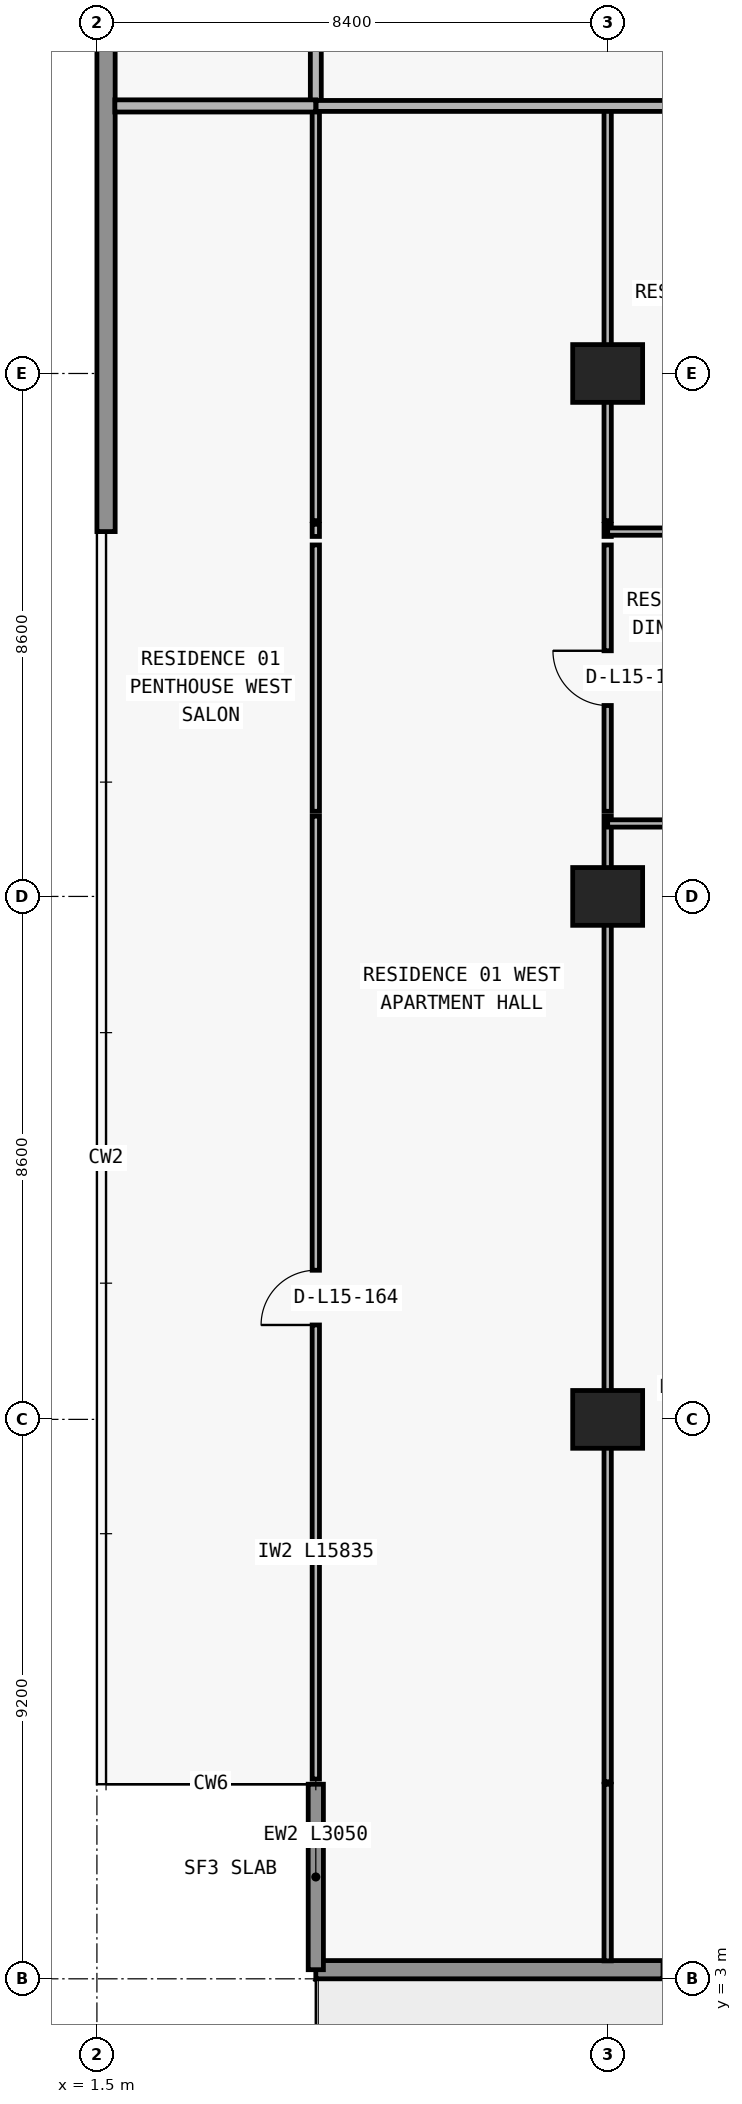
"""IFC4 building model, lengths in metres.
Left out: names, types, materials, properties, quantities, classifications, styles, units other than length and angle.
Written with IfcOpenShell. Run it as: python <this file> out.ifc"""

import sys

from ifc_helpers import new_model, si_unit, direction, frame, frame_2d, origin, origin_2d, place, context, subcontext, project, spatial, rectangle, extrude, element, fill, save


model = new_model("IFC4")
c1 = context("Model", 3, precision=1e-05, world=origin(), true_north=direction((0.0, 1.0)))
c2 = subcontext(c1, "Body", "Model", "MODEL_VIEW")
j1 = project(units=[si_unit("LENGTHUNIT", "METRE"), si_unit("PLANEANGLEUNIT", "RADIAN")], contexts=[c1])
p1 = place(None, origin())
s1 = spatial("IfcSite", under=j1, at=p1, CompositionType="ELEMENT")
p2 = place(p1, origin())
s2 = spatial("IfcBuilding", under=s1, at=p2, CompositionType="ELEMENT")
p3 = place(p2, frame((0.0, 0.0, 59.7)))
s3 = spatial("IfcBuildingStorey", under=s2, at=p3, CompositionType="ELEMENT", Elevation=59.7)
for number, where, z_axis, x_axis in (
    (1, (9.9, 12.2, 0.0), (0.0, 0.0, 1.0), (1.0, 0.0, 0.0)),
    (2, (9.9, 20.8, 0.0), (0.0, 0.0, 1.0), (1.0, 0.0, 0.0)),
    (3, (9.9, 29.4, 0.0), (0.0, 0.0, 1.0), (1.0, 0.0, 0.0)),
):
    element("IfcColumn", number, at=place(p3, frame(where, z_axis=z_axis, x_axis=x_axis)), inside=s3, PredefinedType="COLUMN", context=c2, shape_type="SweptSolid", body=[
        extrude(rectangle(XDim=1.15, YDim=0.95, at=origin_2d()), origin(), (0.0, 0.0, 1.0), 3.05),
    ])
p4 = place(p3, frame((72.7, 3.15, 0.0), z_axis=(0.0, 0.0, 1.0), x_axis=(-1.0, 0.0, 0.0)))
e4 = element("IfcWall", 4, at=p4, inside=s3, PredefinedType="STANDARD", context=c2, shape_type="SweptSolid", body=[
    extrude(rectangle(XDim=67.6, YDim=0.3, at=frame_2d((33.8, 0.0))), origin(), (0.0, 0.0, 1.0), 3.05),
])
p5 = place(p4, frame((59.89, 0.0, 0.0)))
e5 = element("IfcOpeningElement", 5, at=p5, cuts=e4, PredefinedType="OPENING", context=c2, shape_type="SweptSolid", body=[
    extrude(rectangle(XDim=2.0, YDim=2.3, at=frame_2d((1.0, 1.15))), frame((0.0, 0.16, 0.0), z_axis=(0.0, -1.0, 0.0), x_axis=(1.0, 0.0, 0.0)), (0.0, 0.0, 1.0), 0.32),
])
p6 = place(p4, frame((55.21, 0.0, 0.65)))
e6 = element("IfcOpeningElement", 6, at=p6, cuts=e4, PredefinedType="OPENING", context=c2, shape_type="SweptSolid", body=[
    extrude(rectangle(XDim=2.6, YDim=1.85, at=frame_2d((1.3, 0.925))), frame((0.0, 0.16, 0.0), z_axis=(0.0, -1.0, 0.0), x_axis=(1.0, 0.0, 0.0)), (0.0, 0.0, 1.0), 0.32),
])
p7 = place(p4, frame((49.1, 0.0, 0.85)))
e7 = element("IfcOpeningElement", 7, at=p7, cuts=e4, PredefinedType="OPENING", context=c2, shape_type="SweptSolid", body=[
    extrude(rectangle(XDim=2.2, YDim=1.55, at=frame_2d((1.1, 0.775))), frame((0.0, 0.16, 0.0), z_axis=(0.0, -1.0, 0.0), x_axis=(1.0, 0.0, 0.0)), (0.0, 0.0, 1.0), 0.32),
])
p8 = place(p4, frame((43.09, 0.0, 0.0)))
e8 = element("IfcOpeningElement", 8, at=p8, cuts=e4, PredefinedType="OPENING", context=c2, shape_type="SweptSolid", body=[
    extrude(rectangle(XDim=2.0, YDim=2.3, at=frame_2d((1.0, 1.15))), frame((0.0, 0.16, 0.0), z_axis=(0.0, -1.0, 0.0), x_axis=(1.0, 0.0, 0.0)), (0.0, 0.0, 1.0), 0.32),
])
p9 = place(p4, frame((38.41, 0.0, 0.65)))
e9 = element("IfcOpeningElement", 9, at=p9, cuts=e4, PredefinedType="OPENING", context=c2, shape_type="SweptSolid", body=[
    extrude(rectangle(XDim=2.6, YDim=1.85, at=frame_2d((1.3, 0.925))), frame((0.0, 0.16, 0.0), z_axis=(0.0, -1.0, 0.0), x_axis=(1.0, 0.0, 0.0)), (0.0, 0.0, 1.0), 0.32),
])
p10 = place(p4, frame((32.7, 0.0, 0.85)))
e10 = element("IfcOpeningElement", 10, at=p10, cuts=e4, PredefinedType="OPENING", context=c2, shape_type="SweptSolid", body=[
    extrude(rectangle(XDim=2.2, YDim=1.55, at=frame_2d((1.1, 0.775))), frame((0.0, 0.16, 0.0), z_axis=(0.0, -1.0, 0.0), x_axis=(1.0, 0.0, 0.0)), (0.0, 0.0, 1.0), 0.32),
])
p11 = place(p4, frame((27.026, 0.0, 0.0)))
e11 = element("IfcOpeningElement", 11, at=p11, cuts=e4, PredefinedType="OPENING", context=c2, shape_type="SweptSolid", body=[
    extrude(rectangle(XDim=2.0, YDim=2.3, at=frame_2d((1.0, 1.15))), frame((0.0, 0.16, 0.0), z_axis=(0.0, -1.0, 0.0), x_axis=(1.0, 0.0, 0.0)), (0.0, 0.0, 1.0), 0.32),
])
p12 = place(p4, frame((22.726, 0.0, 0.85)))
e12 = element("IfcOpeningElement", 12, at=p12, cuts=e4, PredefinedType="OPENING", context=c2, shape_type="SweptSolid", body=[
    extrude(rectangle(XDim=2.2, YDim=1.55, at=frame_2d((1.1, 0.775))), frame((0.0, 0.16, 0.0), z_axis=(0.0, -1.0, 0.0), x_axis=(1.0, 0.0, 0.0)), (0.0, 0.0, 1.0), 0.32),
])
p13 = place(p4, frame((18.29, 0.0, 0.0)))
e13 = element("IfcOpeningElement", 13, at=p13, cuts=e4, PredefinedType="OPENING", context=c2, shape_type="SweptSolid", body=[
    extrude(rectangle(XDim=2.0, YDim=2.3, at=frame_2d((1.0, 1.15))), frame((0.0, 0.16, 0.0), z_axis=(0.0, -1.0, 0.0), x_axis=(1.0, 0.0, 0.0)), (0.0, 0.0, 1.0), 0.32),
])
p14 = place(p4, frame((14.19, 0.0, 0.85)))
e14 = element("IfcOpeningElement", 14, at=p14, cuts=e4, PredefinedType="OPENING", context=c2, shape_type="SweptSolid", body=[
    extrude(rectangle(XDim=1.8, YDim=1.55, at=frame_2d((0.9, 0.775))), frame((0.0, 0.16, 0.0), z_axis=(0.0, -1.0, 0.0), x_axis=(1.0, 0.0, 0.0)), (0.0, 0.0, 1.0), 0.32),
])
p15 = place(p4, frame((10.226, 0.0, 0.0)))
e15 = element("IfcOpeningElement", 15, at=p15, cuts=e4, PredefinedType="OPENING", context=c2, shape_type="SweptSolid", body=[
    extrude(rectangle(XDim=2.0, YDim=2.3, at=frame_2d((1.0, 1.15))), frame((0.0, 0.16, 0.0), z_axis=(0.0, -1.0, 0.0), x_axis=(1.0, 0.0, 0.0)), (0.0, 0.0, 1.0), 0.32),
])
p16 = place(p4, frame((5.926, 0.0, 0.85)))
e16 = element("IfcOpeningElement", 16, at=p16, cuts=e4, PredefinedType="OPENING", context=c2, shape_type="SweptSolid", body=[
    extrude(rectangle(XDim=2.2, YDim=1.55, at=frame_2d((1.1, 0.775))), frame((0.0, 0.16, 0.0), z_axis=(0.0, -1.0, 0.0), x_axis=(1.0, 0.0, 0.0)), (0.0, 0.0, 1.0), 0.32),
])
p17 = place(p3, frame((5.1, 6.2, 0.0), z_axis=(0.0, 0.0, 1.0), x_axis=(0.0, -1.0, 0.0)))
e17 = element("IfcWall", 17, at=p17, inside=s3, PredefinedType="ELEMENTEDWALL", context=c2, shape_type="SweptSolid", body=[
    extrude(rectangle(XDim=3.05, YDim=0.25, at=frame_2d((1.525, 0.0))), origin(), (0.0, 0.0, 1.0), 3.05),
])
p18 = place(p3, frame((1.65, 26.8, 0.0), z_axis=(0.0, 0.0, 1.0), x_axis=(0.0, 1.0, 0.0)))
e18 = element("IfcWall", 18, at=p18, inside=s3, PredefinedType="STANDARD", context=c2, shape_type="SweptSolid", body=[
    extrude(rectangle(XDim=20.6, YDim=0.3, at=frame_2d((10.3, 0.0))), origin(), (0.0, 0.0, 1.0), 3.05),
])
p19 = place(p3, frame((5.1, 6.285, 0.0), z_axis=(0.0, 0.0, 1.0), x_axis=(0.0, 1.0, 0.0)))
e19 = element("IfcWall", 19, at=p19, inside=s3, PredefinedType="PARTITIONING", context=c2, shape_type="SweptSolid", body=[
    extrude(rectangle(XDim=15.835, YDim=0.12, at=frame_2d((7.917, 0.0))), origin(), (0.0, 0.0, 1.0), 3.05),
])
p20 = place(p19, frame((7.468, 0.0, 0.0)))
e20 = element("IfcOpeningElement", 20, at=p20, cuts=e19, PredefinedType="OPENING", context=c2, shape_type="SweptSolid", body=[
    extrude(rectangle(XDim=0.9, YDim=2.15, at=frame_2d((0.45, 1.075))), frame((0.0, 0.07, 0.0), z_axis=(0.0, -1.0, 0.0), x_axis=(1.0, 0.0, 0.0)), (0.0, 0.0, 1.0), 0.14),
])
p21 = place(p3, frame((5.1, 22.2, 0.0), z_axis=(0.0, 0.0, 1.0), x_axis=(0.0, 1.0, 0.0)))
e21 = element("IfcWall", 21, at=p21, inside=s3, PredefinedType="PARTITIONING", context=c2, shape_type="SweptSolid", body=[
    extrude(rectangle(XDim=4.38, YDim=0.12, at=frame_2d((2.19, 0.0))), origin(), (0.0, 0.0, 1.0), 3.05),
])
p22 = place(p3, frame((5.1, 26.72, 0.0), z_axis=(0.0, 0.0, 1.0), x_axis=(0.0, 1.0, 0.0)))
e22 = element("IfcWall", 22, at=p22, inside=s3, PredefinedType="PARTITIONING", context=c2, shape_type="SweptSolid", body=[
    extrude(rectangle(XDim=0.2, YDim=0.12, at=frame_2d((0.1, 0.0))), origin(), (0.0, 0.0, 1.0), 3.05),
])
p23 = place(p3, frame((5.1, 26.98, 0.0), z_axis=(0.0, 0.0, 1.0), x_axis=(0.0, 1.0, 0.0)))
e23 = element("IfcWall", 23, at=p23, inside=s3, PredefinedType="PARTITIONING", context=c2, shape_type="SweptSolid", body=[
    extrude(rectangle(XDim=6.82, YDim=0.12, at=frame_2d((3.41, 0.0))), origin(), (0.0, 0.0, 1.0), 3.05),
])
p24 = place(p3, frame((5.1, 33.805, 0.0), z_axis=(0.0, 0.0, 1.0), x_axis=(0.0, 1.0, 0.0)))
e24 = element("IfcWall", 24, at=p24, inside=s3, PredefinedType="PARTITIONING", context=c2, shape_type="SweptSolid", body=[
    extrude(rectangle(XDim=3.095, YDim=0.18, at=frame_2d((1.547, 0.0))), origin(), (0.0, 0.0, 1.0), 3.05),
])
p25 = place(p3, frame((9.9, 3.295, 0.0), z_axis=(0.0, 0.0, 1.0), x_axis=(0.0, 1.0, 0.0)))
e25 = element("IfcWall", 25, at=p25, inside=s3, PredefinedType="PARTITIONING", context=c2, shape_type="SweptSolid", body=[
    extrude(rectangle(XDim=2.905, YDim=0.12, at=frame_2d((1.453, 0.0))), origin(), (0.0, 0.0, 1.0), 3.05),
])
p26 = place(p3, frame((9.9, 6.24, 0.0), z_axis=(0.0, 0.0, 1.0), x_axis=(0.0, 1.0, 0.0)))
e26 = element("IfcWall", 26, at=p26, inside=s3, PredefinedType="PARTITIONING", context=c2, shape_type="SweptSolid", body=[
    extrude(rectangle(XDim=15.88, YDim=0.12, at=frame_2d((7.94, 0.0))), origin(), (0.0, 0.0, 1.0), 2.11),
])
p27 = place(p3, frame((9.9, 22.2, 0.0), z_axis=(0.0, 0.0, 1.0), x_axis=(0.0, 1.0, 0.0)))
e27 = element("IfcWall", 27, at=p27, inside=s3, PredefinedType="PARTITIONING", context=c2, shape_type="SweptSolid", body=[
    extrude(rectangle(XDim=4.38, YDim=0.12, at=frame_2d((2.19, 0.0))), origin(), (0.0, 0.0, 1.0), 2.11),
])
p28 = place(p27, frame((1.74, 0.0, 0.0)))
e28 = element("IfcOpeningElement", 28, at=p28, cuts=e27, PredefinedType="OPENING", context=c2, shape_type="SweptSolid", body=[
    extrude(rectangle(XDim=0.9, YDim=2.06, at=frame_2d((0.45, 1.03))), frame((0.0, 0.07, 0.0), z_axis=(0.0, -1.0, 0.0), x_axis=(1.0, 0.0, 0.0)), (0.0, 0.0, 1.0), 0.14),
])
p29 = place(p3, frame((9.9, 26.72, 0.0), z_axis=(0.0, 0.0, 1.0), x_axis=(0.0, 1.0, 0.0)))
e29 = element("IfcWall", 29, at=p29, inside=s3, PredefinedType="PARTITIONING", context=c2, shape_type="SweptSolid", body=[
    extrude(rectangle(XDim=0.2, YDim=0.12, at=frame_2d((0.1, 0.0))), origin(), (0.0, 0.0, 1.0), 2.11),
])
p30 = place(p3, frame((9.9, 26.98, 0.0), z_axis=(0.0, 0.0, 1.0), x_axis=(0.0, 1.0, 0.0)))
e30 = element("IfcWall", 30, at=p30, inside=s3, PredefinedType="PARTITIONING", context=c2, shape_type="SweptSolid", body=[
    extrude(rectangle(XDim=6.82, YDim=0.12, at=frame_2d((3.41, 0.0))), origin(), (0.0, 0.0, 1.0), 2.11),
])
p31 = place(p3, frame((9.9, 22.0, 0.0), z_axis=(0.0, 0.0, 1.0), x_axis=(1.0, 0.0, 0.0)))
e31 = element("IfcWall", 31, at=p31, inside=s3, PredefinedType="PARTITIONING", context=c2, shape_type="SweptSolid", body=[
    extrude(rectangle(XDim=8.4, YDim=0.12, at=frame_2d((4.2, 0.0))), origin(), (0.0, 0.0, 1.0), 3.05),
])
p32 = place(p31, frame((1.44, 0.0, 0.0)))
e32 = element("IfcOpeningElement", 32, at=p32, cuts=e31, PredefinedType="OPENING", context=c2, shape_type="SweptSolid", body=[
    extrude(rectangle(XDim=0.9, YDim=2.15, at=frame_2d((0.45, 1.075))), frame((0.0, 0.07, 0.0), z_axis=(0.0, -1.0, 0.0), x_axis=(1.0, 0.0, 0.0)), (0.0, 0.0, 1.0), 0.14),
])
p33 = place(p3, frame((9.9, 26.8, 0.0), z_axis=(0.0, 0.0, 1.0), x_axis=(1.0, 0.0, 0.0)))
e33 = element("IfcWall", 33, at=p33, inside=s3, PredefinedType="PARTITIONING", context=c2, shape_type="SweptSolid", body=[
    extrude(rectangle(XDim=8.395, YDim=0.12, at=frame_2d((4.198, 0.0))), origin(), (0.0, 0.0, 1.0), 3.05),
])
p34 = place(p33, frame((1.44, 0.0, 0.0)))
e34 = element("IfcOpeningElement", 34, at=p34, cuts=e33, PredefinedType="OPENING", context=c2, shape_type="SweptSolid", body=[
    extrude(rectangle(XDim=0.9, YDim=2.15, at=frame_2d((0.45, 1.075))), frame((0.0, 0.07, 0.0), z_axis=(0.0, -1.0, 0.0), x_axis=(1.0, 0.0, 0.0)), (0.0, 0.0, 1.0), 0.14),
])
p35 = place(p3, frame((1.795, 33.8, 0.0), z_axis=(0.0, 0.0, 1.0), x_axis=(1.0, 0.0, 0.0)))
e35 = element("IfcWall", 35, at=p35, inside=s3, PredefinedType="PARTITIONING", context=c2, shape_type="SweptSolid", body=[
    extrude(rectangle(XDim=3.305, YDim=0.2, at=frame_2d((1.653, 0.0))), origin(), (0.0, 0.0, 1.0), 3.05),
])
p36 = place(p3, frame((5.105, 33.8, 0.0), z_axis=(0.0, 0.0, 1.0), x_axis=(1.0, 0.0, 0.0)))
e36 = element("IfcWall", 36, at=p36, inside=s3, PredefinedType="PARTITIONING", context=c2, shape_type="SweptSolid", body=[
    extrude(rectangle(XDim=67.595, YDim=0.18, at=frame_2d((33.797, 0.0))), origin(), (0.0, 0.0, 1.0), 3.05),
])
p37 = place(p36, frame((7.745, 0.0, 0.0)))
e37 = element("IfcOpeningElement", 37, at=p37, cuts=e36, PredefinedType="OPENING", context=c2, shape_type="SweptSolid", body=[
    extrude(rectangle(XDim=1.0, YDim=2.2, at=frame_2d((0.5, 1.1))), frame((0.0, 0.1, 0.0), z_axis=(0.0, -1.0, 0.0), x_axis=(1.0, 0.0, 0.0)), (0.0, 0.0, 1.0), 0.2),
])
p38 = place(p36, frame((24.545, 0.0, 0.0)))
e38 = element("IfcOpeningElement", 38, at=p38, cuts=e36, PredefinedType="OPENING", context=c2, shape_type="SweptSolid", body=[
    extrude(rectangle(XDim=1.0, YDim=2.2, at=frame_2d((0.5, 1.1))), frame((0.0, 0.1, 0.0), z_axis=(0.0, -1.0, 0.0), x_axis=(1.0, 0.0, 0.0)), (0.0, 0.0, 1.0), 0.2),
])
p39 = place(p36, frame((40.47, 0.0, 0.0)))
e39 = element("IfcOpeningElement", 39, at=p39, cuts=e36, PredefinedType="OPENING", context=c2, shape_type="SweptSolid", body=[
    extrude(rectangle(XDim=1.0, YDim=2.2, at=frame_2d((0.5, 1.1))), frame((0.0, 0.1, 0.0), z_axis=(0.0, -1.0, 0.0), x_axis=(1.0, 0.0, 0.0)), (0.0, 0.0, 1.0), 0.2),
])
p40 = place(p36, frame((48.87, 0.0, 0.0)))
e40 = element("IfcOpeningElement", 40, at=p40, cuts=e36, PredefinedType="OPENING", context=c2, shape_type="SweptSolid", body=[
    extrude(rectangle(XDim=1.0, YDim=2.2, at=frame_2d((0.5, 1.1))), frame((0.0, 0.1, 0.0), z_axis=(0.0, -1.0, 0.0), x_axis=(1.0, 0.0, 0.0)), (0.0, 0.0, 1.0), 0.2),
])
p41 = place(p36, frame((57.27, 0.0, 0.0)))
e41 = element("IfcOpeningElement", 41, at=p41, cuts=e36, PredefinedType="OPENING", context=c2, shape_type="SweptSolid", body=[
    extrude(rectangle(XDim=1.0, YDim=2.2, at=frame_2d((0.5, 1.1))), frame((0.0, 0.1, 0.0), z_axis=(0.0, -1.0, 0.0), x_axis=(1.0, 0.0, 0.0)), (0.0, 0.0, 1.0), 0.2),
])
p42 = place(p28, origin())
e42 = element("IfcDoor", 42, at=p42, inside=s3, OperationType="SINGLE_SWING_RIGHT", PredefinedType="DOOR", context=c2, shape_type="SweptSolid", body=[
    extrude(rectangle(XDim=0.9, YDim=2.06, at=frame_2d((0.45, 1.03))), frame((0.0, 0.025, 0.0), z_axis=(0.0, -1.0, 0.0), x_axis=(1.0, 0.0, 0.0)), (0.0, 0.0, 1.0), 0.05),
])
fill(e28, e42)
p43 = place(p20, origin())
e43 = element("IfcDoor", 43, at=p43, inside=s3, OperationType="SINGLE_SWING_LEFT", PredefinedType="DOOR", context=c2, shape_type="SweptSolid", body=[
    extrude(rectangle(XDim=0.9, YDim=2.15, at=frame_2d((0.45, 1.075))), frame((0.0, 0.025, 0.0), z_axis=(0.0, -1.0, 0.0), x_axis=(1.0, 0.0, 0.0)), (0.0, 0.0, 1.0), 0.05),
])
fill(e20, e43)
save(model, sys.argv[1])
